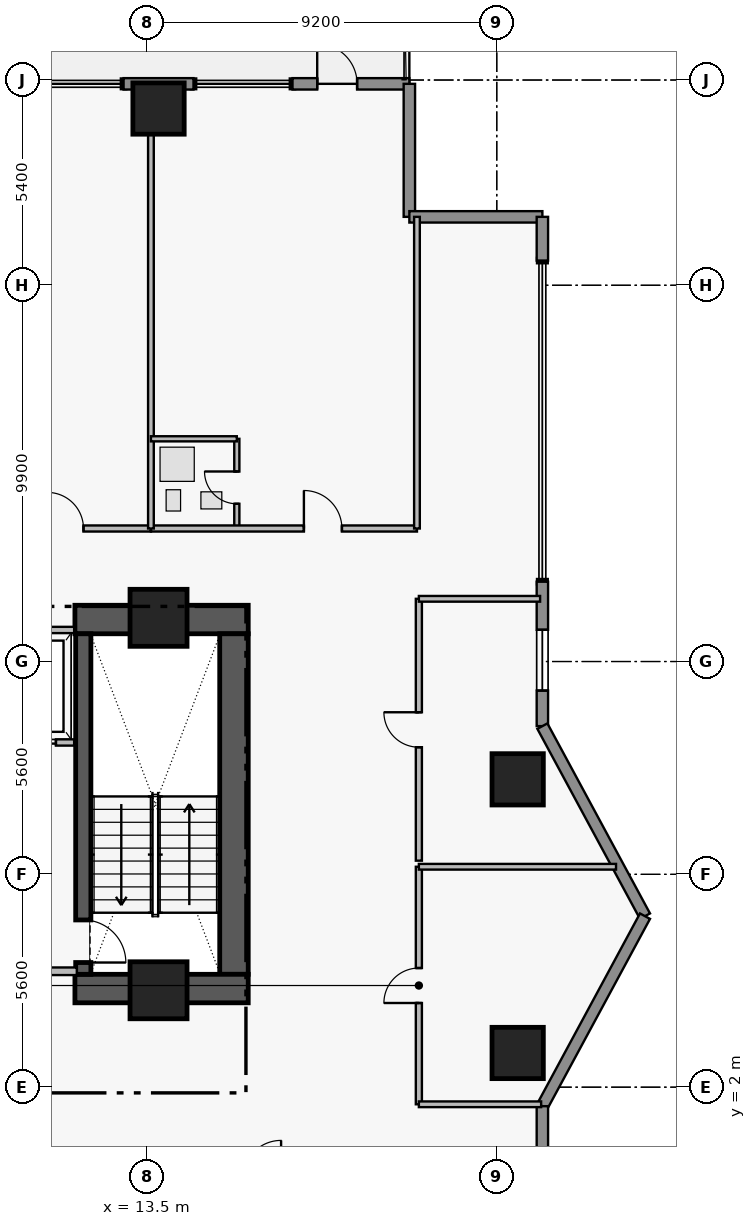
"""IFC4 building model, lengths in metres.
Left out: names, types, materials, properties, quantities, classifications, styles, units other than length and angle.
Written with IfcOpenShell. Run it as: python <this file> out.ifc"""

import sys

from ifc_helpers import new_model, si_unit, direction, frame, frame_2d, origin, origin_2d, place, context, subcontext, project, spatial, rectangle, extrude, element, fill, save


model = new_model("IFC4")
c1 = context("Model", 3, precision=1e-05, world=origin(), true_north=direction((0.0, 1.0)))
c2 = subcontext(c1, "Body", "Model", "MODEL_VIEW")
j1 = project(units=[si_unit("LENGTHUNIT", "METRE"), si_unit("PLANEANGLEUNIT", "RADIAN")], contexts=[c1])
p1 = place(None, origin())
s1 = spatial("IfcSite", under=j1, at=p1, CompositionType="ELEMENT")
p2 = place(p1, origin())
s2 = spatial("IfcBuilding", under=s1, at=p2, CompositionType="ELEMENT")
p3 = place(p2, frame((0.0, 0.0, 132.15)))
s3 = spatial("IfcBuildingStorey", under=s2, at=p3, CompositionType="ELEMENT", Elevation=132.15)
p4 = place(p3, frame((11.6, 14.305, 0.0), z_axis=(0.0, 0.0, 1.0), x_axis=(1.0, 0.0, 0.0)))
e1 = element("IfcWall", 1, at=p4, inside=s3, PredefinedType="SHEAR", context=c2, shape_type="SweptSolid", body=[
    extrude(rectangle(XDim=4.56, YDim=0.75, at=frame_2d((2.28, 0.0))), origin(), (0.0, 0.0, 1.0), 3.46),
])
p5 = place(p3, frame((15.785, 4.97, 0.0), z_axis=(0.0, 0.0, 1.0), x_axis=(0.0, 1.0, 0.0)))
e2 = element("IfcWall", 2, at=p5, inside=s3, PredefinedType="SHEAR", context=c2, shape_type="SweptSolid", body=[
    extrude(rectangle(XDim=8.96, YDim=0.75, at=frame_2d((4.48, 0.0))), origin(), (0.0, 0.0, 1.0), 3.46),
])
p6 = place(p3, frame((11.6, 4.595, 0.0), z_axis=(0.0, 0.0, 1.0), x_axis=(1.0, 0.0, 0.0)))
e3 = element("IfcWall", 3, at=p6, inside=s3, PredefinedType="SHEAR", context=c2, shape_type="SweptSolid", body=[
    extrude(rectangle(XDim=4.56, YDim=0.75, at=frame_2d((2.28, 0.0))), origin(), (0.0, 0.0, 1.0), 3.46),
])
p7 = place(p3, frame((11.82, 13.93, 0.0), z_axis=(0.0, 0.0, 1.0), x_axis=(0.0, -1.0, 0.0)))
e4 = element("IfcWall", 4, at=p7, inside=s3, PredefinedType="SHEAR", context=c2, shape_type="SweptSolid", body=[
    extrude(rectangle(XDim=8.96, YDim=0.4, at=frame_2d((4.48, 0.0))), origin(), (0.0, 0.0, 1.0), 3.46),
])
p8 = place(p7, frame((7.53, 0.0, 0.0)))
e5 = element("IfcOpeningElement", 5, at=p8, cuts=e4, PredefinedType="OPENING", context=c2, shape_type="SweptSolid", body=[
    extrude(rectangle(XDim=1.12, YDim=2.22, at=frame_2d((0.56, 1.11))), frame((0.0, 0.21, 0.0), z_axis=(0.0, -1.0, 0.0), x_axis=(1.0, 0.0, 0.0)), (0.0, 0.0, 1.0), 0.42),
])
for number, where, z_axis, x_axis in (
    (6, (13.8, 14.35, 0.0), (0.0, 0.0, 1.0), (1.0, 0.0, 0.0)),
    (7, (13.8, 4.55, 0.0), (0.0, 0.0, 1.0), (1.0, 0.0, 0.0)),
):
    element("IfcColumn", number, at=place(p3, frame(where, z_axis=z_axis, x_axis=x_axis)), inside=s3, PredefinedType="COLUMN", context=c2, shape_type="SweptSolid", body=[
        extrude(rectangle(XDim=1.5, YDim=1.5, at=origin_2d()), origin(), (0.0, 0.0, 1.0), 3.65),
    ])
for number, where, z_axis, x_axis in (
    (8, (13.8, 27.75, 0.0), (0.0, 0.0, 1.0), (1.0, 0.0, 0.0)),
    (9, (23.25, 2.9, 0.0), (0.0, 0.0, 1.0), (1.0, 0.0, 0.0)),
    (10, (23.25, 10.1, 0.0), (0.0, 0.0, 1.0), (1.0, 0.0, 0.0)),
):
    element("IfcColumn", number, at=place(p3, frame(where, z_axis=z_axis, x_axis=x_axis)), inside=s3, PredefinedType="COLUMN", context=c2, shape_type="SweptSolid", body=[
        extrude(rectangle(XDim=1.35, YDim=1.35, at=origin_2d()), origin(), (0.0, 0.0, 1.0), 3.65),
    ])
p9 = place(p3, frame((12.88, 28.4, 0.0), z_axis=(0.0, 0.0, 1.0), x_axis=(1.0, 0.0, 0.0)))
e11 = element("IfcWall", 11, at=p9, inside=s3, PredefinedType="STANDARD", context=c2, shape_type="SweptSolid", body=[
    extrude(rectangle(XDim=1.84, YDim=0.3, at=frame_2d((0.92, 0.0))), origin(), (0.0, 0.0, 1.0), 3.43),
])
p10 = place(p3, frame((17.325, 28.4, 0.0), z_axis=(0.0, 0.0, 1.0), x_axis=(1.0, 0.0, 0.0)))
e12 = element("IfcWall", 12, at=p10, inside=s3, PredefinedType="STANDARD", context=c2, shape_type="SweptSolid", body=[
    extrude(rectangle(XDim=3.075, YDim=0.3, at=frame_2d((1.538, 0.0))), origin(), (0.0, 0.0, 1.0), 3.43),
])
p11 = place(p10, frame((0.65, 0.0, 0.0)))
e13 = element("IfcOpeningElement", 13, at=p11, cuts=e12, PredefinedType="OPENING", context=c2, shape_type="SweptSolid", body=[
    extrude(rectangle(XDim=1.05, YDim=2.2, at=frame_2d((0.525, 1.1))), frame((0.0, 0.16, 0.0), z_axis=(0.0, -1.0, 0.0), x_axis=(1.0, 0.0, 0.0)), (0.0, 0.0, 1.0), 0.32),
])
for number, where, z_axis, x_axis in (
    (14, (20.4, 28.4, 0.0), (0.0, 0.0, 1.0), (0.0, -1.0, 0.0)),
    (15, (20.4, 24.9, 0.0), (0.0, 0.0, 1.0), (1.0, 0.0, 0.0)),
):
    element("IfcWall", number, at=place(p3, frame(where, z_axis=z_axis, x_axis=x_axis)), inside=s3, PredefinedType="STANDARD", context=c2, shape_type="SweptSolid", body=[
        extrude(rectangle(XDim=3.5, YDim=0.3, at=frame_2d((1.75, 0.0))), origin(), (0.0, 0.0, 1.0), 3.43),
    ])
p12 = place(p3, frame((23.9, 24.9, 0.0), z_axis=(0.0, 0.0, 1.0), x_axis=(0.0, -1.0, 0.0)))
e16 = element("IfcWall", 16, at=p12, inside=s3, PredefinedType="STANDARD", context=c2, shape_type="SweptSolid", body=[
    extrude(rectangle(XDim=1.15, YDim=0.3, at=frame_2d((0.575, 0.0))), origin(), (0.0, 0.0, 1.0), 3.43),
])
p13 = place(p3, frame((23.9, 15.3, 0.0), z_axis=(0.0, 0.0, 1.0), x_axis=(0.0, -1.0, 0.0)))
e17 = element("IfcWall", 17, at=p13, inside=s3, PredefinedType="STANDARD", context=c2, shape_type="SweptSolid", body=[
    extrude(rectangle(XDim=3.8, YDim=0.3, at=frame_2d((1.9, 0.0))), origin(), (0.0, 0.0, 1.0), 3.43),
])
p14 = place(p13, frame((1.265, 0.0, 0.85)))
e18 = element("IfcOpeningElement", 18, at=p14, cuts=e17, PredefinedType="OPENING", context=c2, shape_type="SweptSolid", body=[
    extrude(rectangle(XDim=1.6, YDim=1.8, at=frame_2d((0.8, 0.9))), frame((0.0, 0.16, 0.0), z_axis=(0.0, -1.0, 0.0), x_axis=(1.0, 0.0, 0.0)), (0.0, 0.0, 1.0), 0.32),
])
for number, where, z_axis, x_axis in (
    (19, (23.9, 11.5, 0.0), (0.0, 0.0, 1.0), (0.475, -0.88, 0.0)),
    (20, (26.6, 6.5, 0.0), (0.0, 0.0, 1.0), (-0.475, -0.88, 0.0)),
):
    element("IfcWall", number, at=place(p3, frame(where, z_axis=z_axis, x_axis=x_axis)), inside=s3, PredefinedType="STANDARD", context=c2, shape_type="SweptSolid", body=[
        extrude(rectangle(XDim=5.683, YDim=0.3, at=frame_2d((2.841, 0.0))), origin(), (0.0, 0.0, 1.0), 3.43),
    ])
p15 = place(p3, frame((23.9, 1.5, 0.0), z_axis=(0.0, 0.0, 1.0), x_axis=(0.0, -1.0, 0.0)))
e21 = element("IfcWall", 21, at=p15, inside=s3, PredefinedType="STANDARD", context=c2, shape_type="SweptSolid", body=[
    extrude(rectangle(XDim=1.15, YDim=0.3, at=frame_2d((0.575, 0.0))), origin(), (0.0, 0.0, 1.0), 3.43),
])
p16 = place(p3, frame((9.42, 11.07, 0.0), z_axis=(0.0, 0.0, 1.0), x_axis=(1.0, 0.0, 0.0)))
e22 = element("IfcWall", 22, at=p16, inside=s3, PredefinedType="PARTITIONING", context=c2, shape_type="SweptSolid", body=[
    extrude(rectangle(XDim=2.16, YDim=0.165, at=frame_2d((1.08, 0.0))), origin(), (0.0, 0.0, 1.0), 3.43),
])
p17 = place(p16, frame((0.53, 0.0, 0.0)))
e23 = element("IfcOpeningElement", 23, at=p17, cuts=e22, PredefinedType="OPENING", context=c2, shape_type="SweptSolid", body=[
    extrude(rectangle(XDim=1.15, YDim=2.25, at=frame_2d((0.575, 1.125))), frame((0.0, 0.093, 0.0), z_axis=(0.0, -1.0, 0.0), x_axis=(1.0, 0.0, 0.0)), (0.0, 0.0, 1.0), 0.185),
])
p18 = place(p3, frame((6.8, 16.7, 0.0), z_axis=(0.0, 0.0, 1.0), x_axis=(1.0, 0.0, 0.0)))
e24 = element("IfcWall", 24, at=p18, inside=s3, PredefinedType="PARTITIONING", context=c2, shape_type="SweptSolid", body=[
    extrude(rectangle(XDim=6.8, YDim=0.16, at=frame_2d((3.4, 0.0))), origin(), (0.0, 0.0, 1.0), 2.973),
])
p19 = place(p18, frame((4.075, 0.0, 0.0)))
e25 = element("IfcOpeningElement", 25, at=p19, cuts=e24, PredefinedType="OPENING", context=c2, shape_type="SweptSolid", body=[
    extrude(rectangle(XDim=0.95, YDim=2.15, at=frame_2d((0.475, 1.075))), frame((0.0, 0.09, 0.0), z_axis=(0.0, -1.0, 0.0), x_axis=(1.0, 0.0, 0.0)), (0.0, 0.0, 1.0), 0.18),
])
p20 = place(p3, frame((15.86, 16.7, 0.0), z_axis=(0.0, 0.0, 1.0), x_axis=(0.0, 1.0, 0.0)))
e26 = element("IfcWall", 26, at=p20, inside=s3, PredefinedType="PLUMBINGWALL", context=c2, shape_type="SweptSolid", body=[
    extrude(rectangle(XDim=2.36, YDim=0.135, at=frame_2d((1.18, 0.0))), origin(), (0.0, 0.0, 1.0), 3.43),
])
p21 = place(p20, frame((0.65, 0.0, 0.0)))
e27 = element("IfcOpeningElement", 27, at=p21, cuts=e26, PredefinedType="OPENING", context=c2, shape_type="SweptSolid", body=[
    extrude(rectangle(XDim=0.85, YDim=2.1, at=frame_2d((0.425, 1.05))), frame((0.0, 0.077, 0.0), z_axis=(0.0, -1.0, 0.0), x_axis=(1.0, 0.0, 0.0)), (0.0, 0.0, 1.0), 0.155),
])
p22 = place(p3, frame((13.6, 16.7, 0.0), z_axis=(0.0, 0.0, 1.0), x_axis=(1.0, 0.0, 0.0)))
e28 = element("IfcWall", 28, at=p22, inside=s3, PredefinedType="PARTITIONING", context=c2, shape_type="SweptSolid", body=[
    extrude(rectangle(XDim=7.0, YDim=0.16, at=frame_2d((3.5, 0.0))), origin(), (0.0, 0.0, 1.0), 3.43),
])
p23 = place(p22, frame((4.025, 0.0, 0.0)))
e29 = element("IfcOpeningElement", 29, at=p23, cuts=e28, PredefinedType="OPENING", context=c2, shape_type="SweptSolid", body=[
    extrude(rectangle(XDim=1.0, YDim=2.15, at=frame_2d((0.5, 1.075))), frame((0.0, 0.09, 0.0), z_axis=(0.0, -1.0, 0.0), x_axis=(1.0, 0.0, 0.0)), (0.0, 0.0, 1.0), 0.18),
])
p24 = place(p3, frame((20.65, 1.55, 0.0), z_axis=(0.0, 0.0, 1.0), x_axis=(0.0, 1.0, 0.0)))
e30 = element("IfcWall", 30, at=p24, inside=s3, PredefinedType="PARTITIONING", context=c2, shape_type="SweptSolid", body=[
    extrude(rectangle(XDim=6.25, YDim=0.16, at=frame_2d((3.125, 0.0))), origin(), (0.0, 0.0, 1.0), 3.43),
])
p25 = place(p24, frame((2.665, 0.0, 0.0)))
e31 = element("IfcOpeningElement", 31, at=p25, cuts=e30, PredefinedType="OPENING", context=c2, shape_type="SweptSolid", body=[
    extrude(rectangle(XDim=0.92, YDim=2.12, at=frame_2d((0.46, 1.06))), frame((0.0, 0.09, 0.0), z_axis=(0.0, -1.0, 0.0), x_axis=(1.0, 0.0, 0.0)), (0.0, 0.0, 1.0), 0.18),
])
p26 = place(p3, frame((20.65, 7.96, 0.0), z_axis=(0.0, 0.0, 1.0), x_axis=(0.0, 1.0, 0.0)))
e32 = element("IfcWall", 32, at=p26, inside=s3, PredefinedType="PARTITIONING", context=c2, shape_type="SweptSolid", body=[
    extrude(rectangle(XDim=6.89, YDim=0.16, at=frame_2d((3.445, 0.0))), origin(), (0.0, 0.0, 1.0), 3.43),
])
p27 = place(p26, frame((2.985, 0.0, 0.0)))
e33 = element("IfcOpeningElement", 33, at=p27, cuts=e32, PredefinedType="OPENING", context=c2, shape_type="SweptSolid", body=[
    extrude(rectangle(XDim=0.92, YDim=2.12, at=frame_2d((0.46, 1.06))), frame((0.0, 0.09, 0.0), z_axis=(0.0, -1.0, 0.0), x_axis=(1.0, 0.0, 0.0)), (0.0, 0.0, 1.0), 0.18),
])
p28 = place(p3, frame((8.8, 5.05, 0.0), z_axis=(0.0, 0.0, 1.0), x_axis=(1.0, 0.0, 0.0)))
e34 = element("IfcWall", 34, at=p28, inside=s3, PredefinedType="PARTITIONING", context=c2, shape_type="SweptSolid", body=[
    extrude(rectangle(XDim=2.85, YDim=0.2, at=frame_2d((1.425, 0.0))), origin(), (0.0, 0.0, 1.0), 3.43),
])
p29 = place(p3, frame((9.42, 14.03, 0.0), z_axis=(0.0, 0.0, 1.0), x_axis=(1.0, 0.0, 0.0)))
e35 = element("IfcWall", 35, at=p29, inside=s3, PredefinedType="PARTITIONING", context=c2, shape_type="SweptSolid", body=[
    extrude(rectangle(XDim=2.16, YDim=0.165, at=frame_2d((1.08, 0.0))), origin(), (0.0, 0.0, 1.0), 3.43),
])
p30 = place(p3, frame((13.6, 16.7, 0.0), z_axis=(0.0, 0.0, 1.0), x_axis=(0.0, 1.0, 0.0)))
e36 = element("IfcWall", 36, at=p30, inside=s3, PredefinedType="PARTITIONING", context=c2, shape_type="SweptSolid", body=[
    extrude(rectangle(XDim=11.62, YDim=0.15, at=frame_2d((5.81, 0.0))), origin(), (0.0, 0.0, 1.0), 2.503),
])
p31 = place(p3, frame((13.6, 19.06, 0.0), z_axis=(0.0, 0.0, 1.0), x_axis=(1.0, 0.0, 0.0)))
e37 = element("IfcWall", 37, at=p31, inside=s3, PredefinedType="PLUMBINGWALL", context=c2, shape_type="SweptSolid", body=[
    extrude(rectangle(XDim=2.26, YDim=0.135, at=frame_2d((1.13, 0.0))), origin(), (0.0, 0.0, 1.0), 3.43),
])
p32 = place(p3, frame((20.6, 16.7, 0.0), z_axis=(0.0, 0.0, 1.0), x_axis=(0.0, 1.0, 0.0)))
e38 = element("IfcWall", 38, at=p32, inside=s3, PredefinedType="PARTITIONING", context=c2, shape_type="SweptSolid", body=[
    extrude(rectangle(XDim=8.2, YDim=0.15, at=frame_2d((4.1, 0.0))), origin(), (0.0, 0.0, 1.0), 3.43),
])
p33 = place(p3, frame((20.65, 1.55, 0.0), z_axis=(0.0, 0.0, 1.0), x_axis=(1.0, 0.0, 0.0)))
e39 = element("IfcWall", 39, at=p33, inside=s3, PredefinedType="PARTITIONING", context=c2, shape_type="SweptSolid", body=[
    extrude(rectangle(XDim=3.217, YDim=0.15, at=frame_2d((1.608, 0.0))), origin(), (0.0, 0.0, 1.0), 3.43),
])
p34 = place(p3, frame((20.65, 7.8, 0.0), z_axis=(0.0, 0.0, 1.0), x_axis=(1.0, 0.0, 0.0)))
e40 = element("IfcWall", 40, at=p34, inside=s3, PredefinedType="PARTITIONING", context=c2, shape_type="SweptSolid", body=[
    extrude(rectangle(XDim=5.188, YDim=0.15, at=frame_2d((2.594, 0.0))), origin(), (0.0, 0.0, 1.0), 3.43),
])
p35 = place(p3, frame((20.65, 14.85, 0.0), z_axis=(0.0, 0.0, 1.0), x_axis=(1.0, 0.0, 0.0)))
e41 = element("IfcWall", 41, at=p35, inside=s3, PredefinedType="PARTITIONING", context=c2, shape_type="SweptSolid", body=[
    extrude(rectangle(XDim=3.19, YDim=0.15, at=frame_2d((1.595, 0.0))), origin(), (0.0, 0.0, 1.0), 3.43),
])
p36 = place(p11, origin())
e42 = element("IfcDoor", 42, at=p36, inside=s3, OperationType="SINGLE_SWING_LEFT", PredefinedType="DOOR", context=c2, shape_type="SweptSolid", body=[
    extrude(rectangle(XDim=1.05, YDim=2.2, at=frame_2d((0.525, 1.1))), frame((0.0, 0.025, 0.0), z_axis=(0.0, -1.0, 0.0), x_axis=(1.0, 0.0, 0.0)), (0.0, 0.0, 1.0), 0.05),
])
fill(e13, e42)
p37 = place(p14, origin())
e43 = element("IfcWindow", 43, at=p37, inside=s3, PartitioningType="SINGLE_PANEL", PredefinedType="WINDOW", context=c2, shape_type="SweptSolid", body=[
    extrude(rectangle(XDim=1.6, YDim=1.8, at=frame_2d((0.8, 0.9))), frame((0.0, 0.03, 0.0), z_axis=(0.0, -1.0, 0.0), x_axis=(1.0, 0.0, 0.0)), (0.0, 0.0, 1.0), 0.06),
])
fill(e18, e43)
p38 = place(p8, origin())
e44 = element("IfcDoor", 44, at=p38, inside=s3, OperationType="SINGLE_SWING_RIGHT", PredefinedType="DOOR", context=c2, shape_type="SweptSolid", body=[
    extrude(rectangle(XDim=1.12, YDim=2.22, at=frame_2d((0.56, 1.11))), frame((0.0, 0.025, 0.0), z_axis=(0.0, -1.0, 0.0), x_axis=(1.0, 0.0, 0.0)), (0.0, 0.0, 1.0), 0.05),
])
fill(e5, e44)
p39 = place(p17, origin())
e45 = element("IfcDoor", 45, at=p39, inside=s3, OperationType="SLIDING_TO_LEFT", PredefinedType="DOOR", context=c2, shape_type="SweptSolid", body=[
    extrude(rectangle(XDim=1.15, YDim=2.25, at=frame_2d((0.575, 1.125))), frame((0.0, 0.025, 0.0), z_axis=(0.0, -1.0, 0.0), x_axis=(1.0, 0.0, 0.0)), (0.0, 0.0, 1.0), 0.05),
])
fill(e23, e45)
p40 = place(p19, origin())
e46 = element("IfcDoor", 46, at=p40, inside=s3, OperationType="SINGLE_SWING_LEFT", PredefinedType="DOOR", context=c2, shape_type="SweptSolid", body=[
    extrude(rectangle(XDim=0.95, YDim=2.15, at=frame_2d((0.475, 1.075))), frame((0.0, 0.025, 0.0), z_axis=(0.0, -1.0, 0.0), x_axis=(1.0, 0.0, 0.0)), (0.0, 0.0, 1.0), 0.05),
])
fill(e25, e46)
p41 = place(p21, origin())
e47 = element("IfcDoor", 47, at=p41, inside=s3, OperationType="SINGLE_SWING_RIGHT", PredefinedType="DOOR", context=c2, shape_type="SweptSolid", body=[
    extrude(rectangle(XDim=0.85, YDim=2.1, at=frame_2d((0.425, 1.05))), frame((0.0, 0.025, 0.0), z_axis=(0.0, -1.0, 0.0), x_axis=(1.0, 0.0, 0.0)), (0.0, 0.0, 1.0), 0.05),
])
fill(e27, e47)
p42 = place(p23, origin())
e48 = element("IfcDoor", 48, at=p42, inside=s3, OperationType="SINGLE_SWING_LEFT", PredefinedType="DOOR", context=c2, shape_type="SweptSolid", body=[
    extrude(rectangle(XDim=1.0, YDim=2.15, at=frame_2d((0.5, 1.075))), frame((0.0, 0.025, 0.0), z_axis=(0.0, -1.0, 0.0), x_axis=(1.0, 0.0, 0.0)), (0.0, 0.0, 1.0), 0.05),
])
fill(e29, e48)
p43 = place(p25, origin())
e49 = element("IfcDoor", 49, at=p43, inside=s3, OperationType="SINGLE_SWING_LEFT", PredefinedType="DOOR", context=c2, shape_type="SweptSolid", body=[
    extrude(rectangle(XDim=0.92, YDim=2.12, at=frame_2d((0.46, 1.06))), frame((0.0, 0.025, 0.0), z_axis=(0.0, -1.0, 0.0), x_axis=(1.0, 0.0, 0.0)), (0.0, 0.0, 1.0), 0.05),
])
fill(e31, e49)
p44 = place(p27, origin())
e50 = element("IfcDoor", 50, at=p44, inside=s3, OperationType="SINGLE_SWING_RIGHT", PredefinedType="DOOR", context=c2, shape_type="SweptSolid", body=[
    extrude(rectangle(XDim=0.92, YDim=2.12, at=frame_2d((0.46, 1.06))), frame((0.0, 0.025, 0.0), z_axis=(0.0, -1.0, 0.0), x_axis=(1.0, 0.0, 0.0)), (0.0, 0.0, 1.0), 0.05),
])
fill(e33, e50)
save(model, sys.argv[1])
